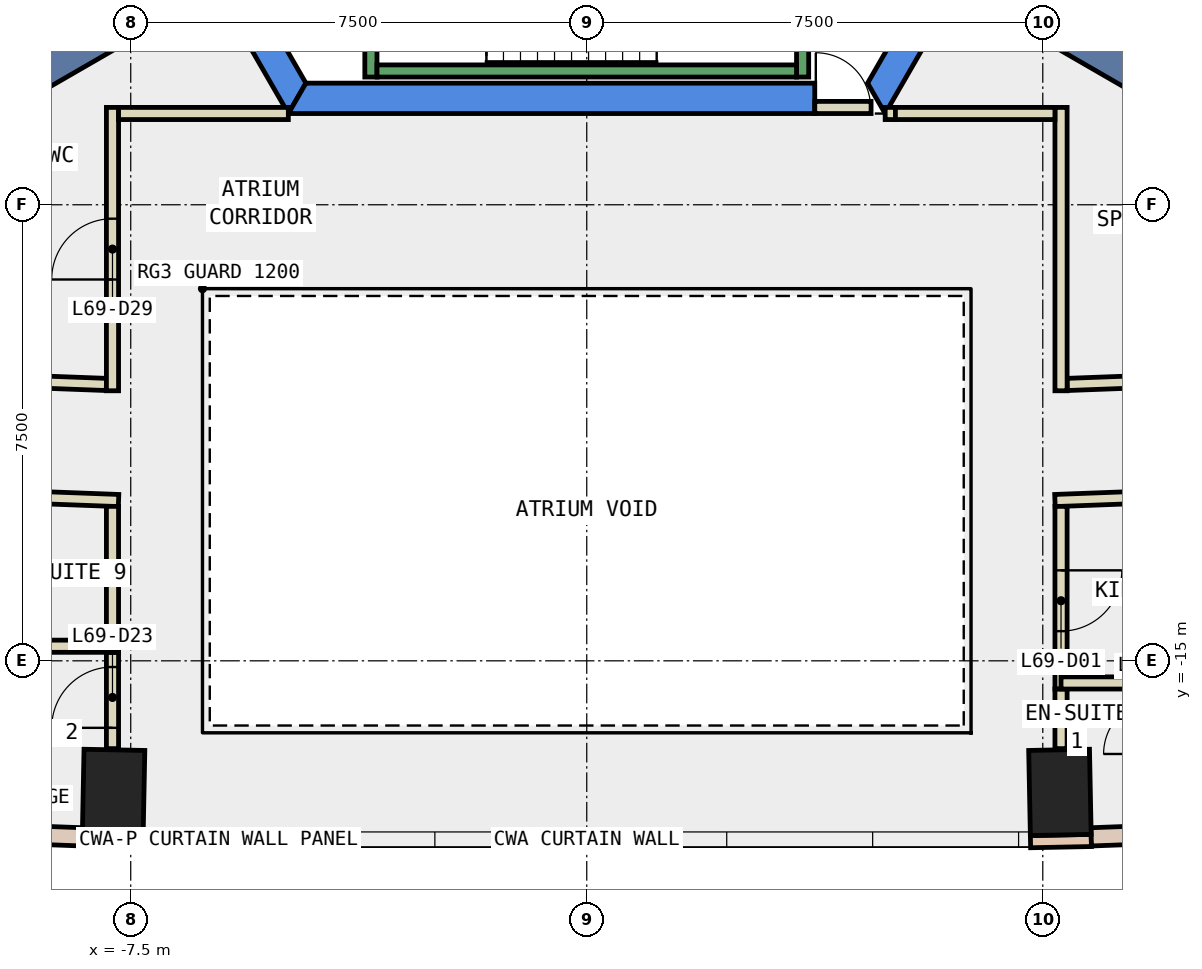
"""IFC4 building model, lengths in metres.
Left out: names, types, materials, properties, quantities, classifications, styles, units other than length and angle.
Written with IfcOpenShell. Run it as: python <this file> out.ifc"""

import sys

from ifc_helpers import new_model, si_unit, direction, frame, frame_2d, origin, origin_2d, place, context, subcontext, project, spatial, polyline, rectangle, outline, extrude, element, fill, save


model = new_model("IFC4")
c1 = context("Model", 3, precision=1e-05, world=origin(), true_north=direction((0.0, 1.0)))
c2 = subcontext(c1, "Body", "Model", "MODEL_VIEW")
j1 = project(units=[si_unit("LENGTHUNIT", "METRE"), si_unit("PLANEANGLEUNIT", "RADIAN")], contexts=[c1])
p1 = place(None, origin())
s1 = spatial("IfcSite", under=j1, at=p1, CompositionType="ELEMENT")
p2 = place(p1, origin())
s2 = spatial("IfcBuilding", under=s1, at=p2, CompositionType="ELEMENT")
p3 = place(p2, frame((0.0, 0.0, 297.2)))
s3 = spatial("IfcBuildingStorey", under=s2, at=p3, CompositionType="ELEMENT", Elevation=297.2)
for number, where, z_axis, x_axis in (
    (1, (-7.782, -17.164, -0.34), (0.0, 0.0, 1.0), (-1.0, 0.02, 0.0)),
    (2, (7.782, -17.164, -0.34), (0.0, 0.0, 1.0), (1.0, 0.02, 0.0)),
):
    element("IfcColumn", number, at=place(p3, frame(where, z_axis=z_axis, x_axis=x_axis)), inside=s3, PredefinedType="COLUMN", context=c2, shape_type="SweptSolid", body=[
        extrude(rectangle(XDim=1.0, YDim=1.4, at=origin_2d()), origin(), (0.0, 0.0, 1.0), 3.6),
    ])
p4 = place(p3, frame((0.0, 0.0, -0.34)))
e3 = element("IfcWall", 3, at=p4, inside=s3, PredefinedType="SHEAR", context=c2, shape_type="SweptSolid", body=[
    extrude(outline(polyline([(-9.815, 2.5), (-4.907, -6.0), (-4.619, -5.5), (-9.238, 2.5), (-9.815, 2.5)])), origin(), (0.0, 0.0, 1.0), 3.6),
])
p5 = place(p3, frame((0.0, 0.0, -0.34)))
e4 = element("IfcWall", 4, at=p5, inside=s3, PredefinedType="SHEAR", context=c2, shape_type="SweptSolid", body=[
    extrude(outline(polyline([(3.75, -6.0), (3.75, -5.5), (-4.619, -5.5), (-4.907, -6.0), (3.75, -6.0)])), origin(), (0.0, 0.0, 1.0), 3.6),
])
p6 = place(p3, frame((0.0, 0.0, -0.34)))
e5 = element("IfcWall", 5, at=p6, inside=s3, PredefinedType="SHEAR", context=c2, shape_type="SweptSolid", body=[
    extrude(outline(polyline([(4.907, -6.0), (9.815, 2.5), (9.238, 2.5), (4.619, -5.5), (4.907, -6.0)])), origin(), (0.0, 0.0, 1.0), 3.6),
])
for number, where, z_axis, x_axis in (
    (6, (6.279, -3.625, -0.34), (0.0, 0.0, 1.0), (0.866, -0.5, 0.0)),
    (7, (-6.279, -3.625, -0.34), (0.0, 0.0, 1.0), (-0.866, -0.5, 0.0)),
):
    element("IfcWall", number, at=place(p3, frame(where, z_axis=z_axis, x_axis=x_axis)), inside=s3, PredefinedType="SHEAR", context=c2, shape_type="SweptSolid", body=[
        extrude(rectangle(XDim=9.0, YDim=0.8, at=frame_2d((4.5, 0.0))), origin(), (0.0, 0.0, 1.0), 3.6),
    ])
for number, where, z_axis, x_axis in (
    (8, (-8.298, -17.954, 0.0), (0.0, 0.0, 1.0), (1.0, -0.02, 0.0)),
    (9, (7.298, -17.974, 0.0), (0.0, 0.0, 1.0), (1.0, 0.02, 0.0)),
):
    element("IfcWall", number, at=place(p3, frame(where, z_axis=z_axis, x_axis=x_axis)), inside=s3, PredefinedType="STANDARD", context=c2, shape_type="SweptSolid", body=[
        extrude(rectangle(XDim=1.0, YDim=0.2, at=frame_2d((0.5, 0.0))), origin(), (0.0, 0.0, 1.0), 3.26),
    ])
p7 = place(p3, frame((-11.92, -17.76, 0.0), z_axis=(0.0, 0.0, 1.0), x_axis=(0.999306787149, -0.037228284377, 0.0)))
e10 = element("IfcWall", 10, at=p7, inside=s3, PredefinedType="STANDARD", context=c2, shape_type="SweptSolid", body=[
    extrude(rectangle(XDim=3.626, YDim=0.3, at=frame_2d((1.813, 0.0))), origin(), (0.0, 0.0, 1.0), 3.26),
])
p8 = place(p7, frame((1.113, 0.0, 0.9)))
e11 = element("IfcOpeningElement", 11, at=p8, cuts=e10, PredefinedType="OPENING", context=c2, shape_type="SweptSolid", body=[
    extrude(rectangle(XDim=1.4, YDim=2.0, at=frame_2d((0.7, 1.0))), frame((0.0, 0.16, 0.0), z_axis=(0.0, -1.0, 0.0), x_axis=(1.0, 0.0, 0.0)), (0.0, 0.0, 1.0), 0.32),
])
p9 = place(p3, frame((8.296, -17.895, 0.0), z_axis=(0.0, 0.0, 1.0), x_axis=(0.999306787149, 0.037228284377, 0.0)))
e12 = element("IfcWall", 12, at=p9, inside=s3, PredefinedType="STANDARD", context=c2, shape_type="SweptSolid", body=[
    extrude(rectangle(XDim=3.626, YDim=0.3, at=frame_2d((1.813, 0.0))), origin(), (0.0, 0.0, 1.0), 3.26),
])
p10 = place(p9, frame((1.113, 0.0, 0.9)))
e13 = element("IfcOpeningElement", 13, at=p10, cuts=e12, PredefinedType="OPENING", context=c2, shape_type="SweptSolid", body=[
    extrude(rectangle(XDim=1.4, YDim=2.0, at=frame_2d((0.7, 1.0))), frame((0.0, 0.16, 0.0), z_axis=(0.0, -1.0, 0.0), x_axis=(1.0, 0.0, 0.0)), (0.0, 0.0, 1.0), 0.32),
])
p11 = place(p3, frame((7.9, -10.455, 0.0), z_axis=(0.0, 0.0, 1.0), x_axis=(0.999297278907, 0.037482640915, 0.0)))
e14 = element("IfcWall", 14, at=p11, inside=s3, PredefinedType="PARTITIONING", context=c2, shape_type="SweptSolid", body=[
    extrude(rectangle(XDim=3.394, YDim=0.2, at=frame_2d((1.697, 0.0))), origin(), (0.0, 0.0, 1.0), 3.26),
])
p12 = place(p11, frame((1.196, 0.0, 0.0)))
e15 = element("IfcOpeningElement", 15, at=p12, cuts=e14, PredefinedType="OPENING", context=c2, shape_type="SweptSolid", body=[
    extrude(rectangle(XDim=1.0, YDim=2.1, at=frame_2d((0.5, 1.05))), frame((0.0, 0.11, 0.0), z_axis=(0.0, -1.0, 0.0), x_axis=(1.0, 0.0, 0.0)), (0.0, 0.0, 1.0), 0.22),
])
p13 = place(p3, frame((-9.902, -10.38, 0.0), z_axis=(0.0, 0.0, 1.0), x_axis=(0.999295503749, -0.037529937222, 0.0)))
e16 = element("IfcWall", 16, at=p13, inside=s3, PredefinedType="PARTITIONING", context=c2, shape_type="SweptSolid", body=[
    extrude(rectangle(XDim=2.004, YDim=0.2, at=frame_2d((1.002, 0.0))), origin(), (0.0, 0.0, 1.0), 3.26),
])
p14 = place(p3, frame((11.53, -12.22, 0.0), z_axis=(0.0, 0.0, 1.0), x_axis=(-0.999293554816, -0.037581794833, 0.0)))
e17 = element("IfcWall", 17, at=p14, inside=s3, PredefinedType="PARTITIONING", context=c2, shape_type="SweptSolid", body=[
    extrude(rectangle(XDim=3.833, YDim=0.2, at=frame_2d((1.917, 0.0))), origin(), (0.0, 0.0, 1.0), 3.26),
])
p15 = place(p3, frame((-7.7, -12.364, 0.0), z_axis=(0.0, 0.0, 1.0), x_axis=(-0.999295758095, 0.037523164215, 0.0)))
e18 = element("IfcWall", 18, at=p15, inside=s3, PredefinedType="PARTITIONING", context=c2, shape_type="SweptSolid", body=[
    extrude(rectangle(XDim=2.401, YDim=0.2, at=frame_2d((1.2, 0.0))), origin(), (0.0, 0.0, 1.0), 3.26),
])
p16 = place(p3, frame((4.908, -5.999, 0.0), z_axis=(0.0, 0.0, 1.0), x_axis=(1.0, 0.0, 0.0)))
e19 = element("IfcWall", 19, at=p16, inside=s3, PredefinedType="PARTITIONING", context=c2, shape_type="SweptSolid", body=[
    extrude(rectangle(XDim=0.168, YDim=0.2, at=frame_2d((0.084, 0.0))), origin(), (0.0, 0.0, 1.0), 2.4),
])
p17 = place(p3, frame((7.8, -5.899, 0.0), z_axis=(0.0, 0.0, 1.0), x_axis=(0.0, -1.0, 0.0)))
e20 = element("IfcWall", 20, at=p17, inside=s3, PredefinedType="PARTITIONING", context=c2, shape_type="SweptSolid", body=[
    extrude(rectangle(XDim=4.66, YDim=0.2, at=frame_2d((2.33, 0.0))), origin(), (0.0, 0.0, 1.0), 3.26),
])
p18 = place(p3, frame((-7.8, -10.559, 0.0), z_axis=(0.0, 0.0, 1.0), x_axis=(0.0, 1.0, 0.0)))
e21 = element("IfcWall", 21, at=p18, inside=s3, PredefinedType="PARTITIONING", context=c2, shape_type="SweptSolid", body=[
    extrude(rectangle(XDim=4.66, YDim=0.2, at=frame_2d((2.33, 0.0))), origin(), (0.0, 0.0, 1.0), 3.26),
])
p19 = place(p18, frame((1.83, 0.0, 0.0)))
e22 = element("IfcOpeningElement", 22, at=p19, cuts=e21, PredefinedType="OPENING", context=c2, shape_type="SweptSolid", body=[
    extrude(rectangle(XDim=1.0, YDim=2.1, at=frame_2d((0.5, 1.05))), frame((0.0, 0.11, 0.0), z_axis=(0.0, -1.0, 0.0), x_axis=(1.0, 0.0, 0.0)), (0.0, 0.0, 1.0), 0.22),
])
p20 = place(p3, frame((-7.7, -5.999, 0.0), z_axis=(0.0, 0.0, 1.0), x_axis=(1.0, 0.0, 0.0)))
e23 = element("IfcWall", 23, at=p20, inside=s3, PredefinedType="PARTITIONING", context=c2, shape_type="SweptSolid", body=[
    extrude(rectangle(XDim=2.792, YDim=0.2, at=frame_2d((1.396, 0.0))), origin(), (0.0, 0.0, 1.0), 3.26),
])
p21 = place(p3, frame((7.8, -12.46, 0.0), z_axis=(0.0, 0.0, 1.0), x_axis=(0.0, -1.0, 0.0)))
e24 = element("IfcWall", 24, at=p21, inside=s3, PredefinedType="PARTITIONING", context=c2, shape_type="SweptSolid", body=[
    extrude(rectangle(XDim=3.004, YDim=0.2, at=frame_2d((1.502, 0.0))), origin(), (0.0, 0.0, 1.0), 3.26),
])
p22 = place(p21, frame((1.052, 0.0, 0.0)))
e25 = element("IfcOpeningElement", 25, at=p22, cuts=e24, PredefinedType="OPENING", context=c2, shape_type="SweptSolid", body=[
    extrude(rectangle(XDim=1.0, YDim=2.1, at=frame_2d((0.5, 1.05))), frame((0.0, 0.11, 0.0), z_axis=(0.0, -1.0, 0.0), x_axis=(1.0, 0.0, 0.0)), (0.0, 0.0, 1.0), 0.22),
])
p23 = place(p3, frame((7.8, -15.464, 0.0), z_axis=(0.0, 0.0, 1.0), x_axis=(0.0, -1.0, 0.0)))
e26 = element("IfcWall", 26, at=p23, inside=s3, PredefinedType="PARTITIONING", context=c2, shape_type="SweptSolid", body=[
    extrude(rectangle(XDim=0.98, YDim=0.2, at=frame_2d((0.49, 0.0))), origin(), (0.0, 0.0, 1.0), 3.26),
])
p24 = place(p3, frame((-7.8, -16.444, 0.0), z_axis=(0.0, 0.0, 1.0), x_axis=(0.0, 1.0, 0.0)))
e27 = element("IfcWall", 27, at=p24, inside=s3, PredefinedType="PARTITIONING", context=c2, shape_type="SweptSolid", body=[
    extrude(rectangle(XDim=1.584, YDim=0.2, at=frame_2d((0.792, 0.0))), origin(), (0.0, 0.0, 1.0), 3.26),
])
p25 = place(p24, frame((0.342, 0.0, 0.0)))
e28 = element("IfcOpeningElement", 28, at=p25, cuts=e27, PredefinedType="OPENING", context=c2, shape_type="SweptSolid", body=[
    extrude(rectangle(XDim=1.0, YDim=2.1, at=frame_2d((0.5, 1.05))), frame((0.0, 0.11, 0.0), z_axis=(0.0, -1.0, 0.0), x_axis=(1.0, 0.0, 0.0)), (0.0, 0.0, 1.0), 0.22),
])
p26 = place(p3, frame((-7.8, -14.86, 0.0), z_axis=(0.0, 0.0, 1.0), x_axis=(0.0, 1.0, 0.0)))
e29 = element("IfcWall", 29, at=p26, inside=s3, PredefinedType="PARTITIONING", context=c2, shape_type="SweptSolid", body=[
    extrude(rectangle(XDim=2.4, YDim=0.2, at=frame_2d((1.2, 0.0))), origin(), (0.0, 0.0, 1.0), 3.26),
])
p27 = place(p3, frame((6.835, -2.662, 0.0), z_axis=(0.0, 0.0, 1.0), x_axis=(0.866023427642, -0.500003422764, 0.0)))
e30 = element("IfcWall", 30, at=p27, inside=s3, PredefinedType="PARTITIONING", context=c2, shape_type="SweptSolid", body=[
    extrude(rectangle(XDim=8.65, YDim=0.1, at=frame_2d((4.325, 0.0))), origin(), (0.0, 0.0, 1.0), 3.26),
])
p28 = place(p3, frame((-6.804, -2.714, 0.0), z_axis=(0.0, 0.0, 1.0), x_axis=(-0.866057565063, -0.499944290893, 0.0)))
e31 = element("IfcWall", 31, at=p28, inside=s3, PredefinedType="PARTITIONING", context=c2, shape_type="SweptSolid", body=[
    extrude(rectangle(XDim=6.7, YDim=0.2, at=frame_2d((3.35, 0.0))), origin(), (0.0, 0.0, 1.0), 3.26),
])
p29 = place(p3, frame((9.3, -15.364, 0.0), z_axis=(0.0, 0.0, 1.0), x_axis=(-1.0, 0.0, 0.0)))
e32 = element("IfcWall", 32, at=p29, inside=s3, PredefinedType="PARTITIONING", context=c2, shape_type="SweptSolid", body=[
    extrude(rectangle(XDim=1.5, YDim=0.2, at=frame_2d((0.75, 0.0))), origin(), (0.0, 0.0, 1.0), 3.26),
])
p30 = place(p3, frame((-10.1, -14.76, 0.0), z_axis=(0.0, 0.0, 1.0), x_axis=(1.0, 0.0, 0.0)))
e33 = element("IfcWall", 33, at=p30, inside=s3, PredefinedType="PARTITIONING", context=c2, shape_type="SweptSolid", body=[
    extrude(rectangle(XDim=2.3, YDim=0.2, at=frame_2d((1.15, 0.0))), origin(), (0.0, 0.0, 1.0), 3.26),
])
p31 = place(p3, frame((3.75, -5.9, 0.0), z_axis=(0.0, 0.0, 1.0), x_axis=(1.0, 0.0, 0.0)))
e34 = element("IfcWall", 34, at=p31, inside=s3, PredefinedType="PARTITIONING", context=c2, shape_type="SweptSolid", body=[
    extrude(rectangle(XDim=0.926, YDim=0.2, at=frame_2d((0.463, 0.0))), origin(), (0.0, 0.0, 1.0), 2.4),
])
p32 = place(p31, frame((0.017, 0.0, 0.0)))
e35 = element("IfcOpeningElement", 35, at=p32, cuts=e34, PredefinedType="OPENING", context=c2, shape_type="SweptSolid", body=[
    extrude(rectangle(XDim=0.9, YDim=2.1, at=frame_2d((0.45, 1.05))), frame((0.0, 0.11, 0.0), z_axis=(0.0, -1.0, 0.0), x_axis=(1.0, 0.0, 0.0)), (0.0, 0.0, 1.0), 0.22),
])
p33 = place(p3, frame((5.076, -5.999, 0.0), z_axis=(0.0, 0.0, 1.0), x_axis=(1.0, 0.0, 0.0)))
e36 = element("IfcWall", 36, at=p33, inside=s3, PredefinedType="PARTITIONING", context=c2, shape_type="SweptSolid", body=[
    extrude(rectangle(XDim=2.624, YDim=0.2, at=frame_2d((1.312, 0.0))), origin(), (0.0, 0.0, 1.0), 3.26),
])
p34 = place(p3, frame((-3.55, -1.0, 0.0), z_axis=(0.0, 0.0, 1.0), x_axis=(0.0, -1.0, 0.0)))
e37 = element("IfcWall", 37, at=p34, inside=s3, PredefinedType="STANDARD", context=c2, shape_type="SweptSolid", body=[
    extrude(rectangle(XDim=4.4, YDim=0.2, at=frame_2d((2.2, 0.0))), origin(), (0.0, 0.0, 1.0), 3.26),
])
p35 = place(p34, frame((2.4, 0.0, 0.0)))
e38 = element("IfcOpeningElement", 38, at=p35, cuts=e37, PredefinedType="OPENING", context=c2, shape_type="SweptSolid", body=[
    extrude(rectangle(XDim=1.1, YDim=2.2, at=frame_2d((0.55, 1.1))), frame((0.0, 0.11, 0.0), z_axis=(0.0, -1.0, 0.0), x_axis=(1.0, 0.0, 0.0)), (0.0, 0.0, 1.0), 0.22),
])
p36 = place(p3, frame((3.55, -2.667, 0.0), z_axis=(0.0, 0.0, 1.0), x_axis=(0.0, -1.0, 0.0)))
e39 = element("IfcWall", 39, at=p36, inside=s3, PredefinedType="STANDARD", context=c2, shape_type="SweptSolid", body=[
    extrude(rectangle(XDim=2.733, YDim=0.2, at=frame_2d((1.366, 0.0))), origin(), (0.0, 0.0, 1.0), 3.26),
])
p37 = place(p3, frame((-3.45, -5.3, 0.0), z_axis=(0.0, 0.0, 1.0), x_axis=(1.0, 0.0, 0.0)))
e40 = element("IfcWall", 40, at=p37, inside=s3, PredefinedType="STANDARD", context=c2, shape_type="SweptSolid", body=[
    extrude(rectangle(XDim=6.9, YDim=0.2, at=frame_2d((3.45, 0.0))), origin(), (0.0, 0.0, 1.0), 3.26),
])
p38 = place(p22, origin())
e41 = element("IfcDoor", 41, at=p38, inside=s3, OperationType="SINGLE_SWING_RIGHT", PredefinedType="DOOR", context=c2, shape_type="SweptSolid", body=[
    extrude(rectangle(XDim=1.0, YDim=2.1, at=frame_2d((0.5, 1.05))), frame((0.0, 0.025, 0.0), z_axis=(0.0, -1.0, 0.0), x_axis=(1.0, 0.0, 0.0)), (0.0, 0.0, 1.0), 0.05),
])
fill(e25, e41)
p39 = place(p25, origin())
e42 = element("IfcDoor", 42, at=p39, inside=s3, OperationType="SINGLE_SWING_RIGHT", PredefinedType="DOOR", context=c2, shape_type="SweptSolid", body=[
    extrude(rectangle(XDim=1.0, YDim=2.1, at=frame_2d((0.5, 1.05))), frame((0.0, 0.025, 0.0), z_axis=(0.0, -1.0, 0.0), x_axis=(1.0, 0.0, 0.0)), (0.0, 0.0, 1.0), 0.05),
])
fill(e28, e42)
p40 = place(p19, origin())
e43 = element("IfcDoor", 43, at=p40, inside=s3, OperationType="SINGLE_SWING_LEFT", PredefinedType="DOOR", context=c2, shape_type="SweptSolid", body=[
    extrude(rectangle(XDim=1.0, YDim=2.1, at=frame_2d((0.5, 1.05))), frame((0.0, 0.025, 0.0), z_axis=(0.0, -1.0, 0.0), x_axis=(1.0, 0.0, 0.0)), (0.0, 0.0, 1.0), 0.05),
])
fill(e22, e43)
p41 = place(p32, origin())
e44 = element("IfcDoor", 44, at=p41, inside=s3, OperationType="SINGLE_SWING_LEFT", PredefinedType="DOOR", context=c2, shape_type="SweptSolid", body=[
    extrude(rectangle(XDim=0.9, YDim=2.1, at=frame_2d((0.45, 1.05))), frame((0.0, 0.025, 0.0), z_axis=(0.0, -1.0, 0.0), x_axis=(1.0, 0.0, 0.0)), (0.0, 0.0, 1.0), 0.05),
])
fill(e35, e44)
save(model, sys.argv[1])
